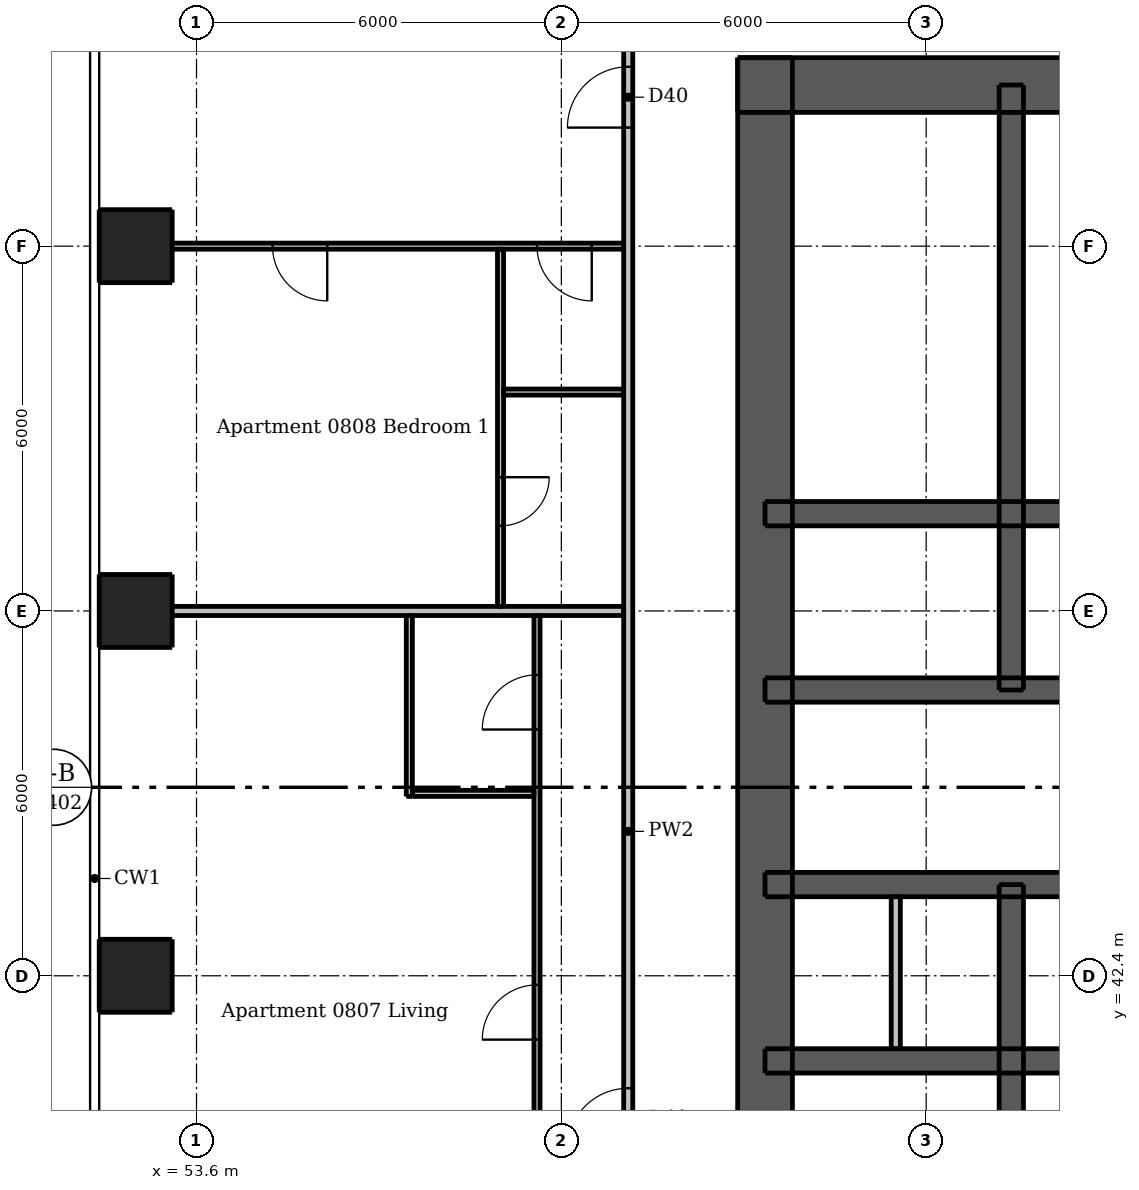
"""IFC4 building model, lengths in metres.
Left out: names, types, materials, properties, quantities, classifications, styles, units other than length and angle.
Written with IfcOpenShell. Run it as: python <this file> out.ifc"""

import sys

from ifc_helpers import new_model, si_unit, direction, frame, frame_2d, origin, origin_2d, place, context, subcontext, project, spatial, rectangle, extrude, element, fill, save


model = new_model("IFC4")
c1 = context("Model", 3, precision=1e-05, world=origin(), true_north=direction((0.0, 1.0)))
c2 = subcontext(c1, "Body", "Model", "MODEL_VIEW")
j1 = project(units=[si_unit("LENGTHUNIT", "METRE"), si_unit("PLANEANGLEUNIT", "RADIAN")], contexts=[c1])
p1 = place(None, origin())
s1 = spatial("IfcSite", under=j1, at=p1, CompositionType="ELEMENT")
p2 = place(p1, origin())
s2 = spatial("IfcBuilding", under=s1, at=p2, CompositionType="ELEMENT")
p3 = place(p2, frame((0.0, 0.0, 33.4)))
s3 = spatial("IfcBuildingStorey", under=s2, at=p3, CompositionType="ELEMENT", Elevation=33.4)
p4 = place(p3, frame((62.5, 57.05, 0.0), z_axis=(0.0, 0.0, 1.0), x_axis=(1.0, 0.0, 0.0)))
e1 = element("IfcWall", 1, at=p4, inside=s3, PredefinedType="SHEAR", context=c2, shape_type="SweptSolid", body=[
    extrude(rectangle(XDim=24.0, YDim=0.9, at=frame_2d((12.0, 0.0))), origin(), (0.0, 0.0, 1.0), 3.05),
])
p5 = place(p4, frame((20.85, 0.0, 0.0)))
e2 = element("IfcOpeningElement", 2, at=p5, cuts=e1, PredefinedType="OPENING", context=c2, shape_type="SweptSolid", body=[
    extrude(rectangle(XDim=1.1, YDim=2.1, at=frame_2d((0.55, 1.05))), frame((0.0, 0.46, 0.0), z_axis=(0.0, -1.0, 0.0), x_axis=(1.0, 0.0, 0.0)), (0.0, 0.0, 1.0), 0.92),
])
p6 = place(p4, frame((2.05, 0.0, 0.0)))
e3 = element("IfcOpeningElement", 3, at=p6, cuts=e1, PredefinedType="OPENING", context=c2, shape_type="SweptSolid", body=[
    extrude(rectangle(XDim=1.1, YDim=2.1, at=frame_2d((0.55, 1.05))), frame((0.0, 0.46, 0.0), z_axis=(0.0, -1.0, 0.0), x_axis=(1.0, 0.0, 0.0)), (0.0, 0.0, 1.0), 0.92),
])
p7 = place(p4, frame((7.9, 0.0, 0.0)))
e4 = element("IfcOpeningElement", 4, at=p7, cuts=e1, PredefinedType="OPENING", context=c2, shape_type="SweptSolid", body=[
    extrude(rectangle(XDim=0.9, YDim=2.1, at=frame_2d((0.45, 1.05))), frame((0.0, 0.46, 0.0), z_axis=(0.0, -1.0, 0.0), x_axis=(1.0, 0.0, 0.0)), (0.0, 0.0, 1.0), 0.92),
])
p8 = place(p4, frame((15.2, 0.0, 0.0)))
e5 = element("IfcOpeningElement", 5, at=p8, cuts=e1, PredefinedType="OPENING", context=c2, shape_type="SweptSolid", body=[
    extrude(rectangle(XDim=0.9, YDim=2.1, at=frame_2d((0.45, 1.05))), frame((0.0, 0.46, 0.0), z_axis=(0.0, -1.0, 0.0), x_axis=(1.0, 0.0, 0.0)), (0.0, 0.0, 1.0), 0.92),
])
p9 = place(p3, frame((62.95, 33.5, 0.0), z_axis=(0.0, 0.0, 1.0), x_axis=(0.0, 1.0, 0.0)))
e6 = element("IfcWall", 6, at=p9, inside=s3, PredefinedType="SHEAR", context=c2, shape_type="SweptSolid", body=[
    extrude(rectangle(XDim=24.0, YDim=0.9, at=frame_2d((12.0, 0.0))), origin(), (0.0, 0.0, 1.0), 3.05),
])
p10 = place(p9, frame((11.2, 0.0, 0.0)))
e7 = element("IfcOpeningElement", 7, at=p10, cuts=e6, PredefinedType="OPENING", context=c2, shape_type="SweptSolid", body=[
    extrude(rectangle(XDim=1.6, YDim=2.1, at=frame_2d((0.8, 1.05))), frame((0.0, 0.46, 0.0), z_axis=(0.0, -1.0, 0.0), x_axis=(1.0, 0.0, 0.0)), (0.0, 0.0, 1.0), 0.92),
])
p11 = place(p3, frame((62.95, 41.0, 0.0), z_axis=(0.0, 0.0, 1.0), x_axis=(1.0, 0.0, 0.0)))
e8 = element("IfcWall", 8, at=p11, inside=s3, PredefinedType="SHEAR", context=c2, shape_type="SweptSolid", body=[
    extrude(rectangle(XDim=23.1, YDim=0.4, at=frame_2d((11.55, 0.0))), origin(), (0.0, 0.0, 1.0), 3.05),
])
p12 = place(p3, frame((62.95, 43.9, 0.0), z_axis=(0.0, 0.0, 1.0), x_axis=(1.0, 0.0, 0.0)))
e9 = element("IfcWall", 9, at=p12, inside=s3, PredefinedType="SHEAR", context=c2, shape_type="SweptSolid", body=[
    extrude(rectangle(XDim=23.1, YDim=0.4, at=frame_2d((11.55, 0.0))), origin(), (0.0, 0.0, 1.0), 3.05),
])
p13 = place(p12, frame((0.85, 0.0, 0.0)))
e10 = element("IfcOpeningElement", 10, at=p13, cuts=e9, PredefinedType="OPENING", context=c2, shape_type="SweptSolid", body=[
    extrude(rectangle(XDim=0.9, YDim=2.1, at=frame_2d((0.45, 1.05))), frame((0.0, 0.21, 0.0), z_axis=(0.0, -1.0, 0.0), x_axis=(1.0, 0.0, 0.0)), (0.0, 0.0, 1.0), 0.42),
])
p14 = place(p12, frame((2.55, 0.0, 0.0)))
e11 = element("IfcOpeningElement", 11, at=p14, cuts=e9, PredefinedType="OPENING", context=c2, shape_type="SweptSolid", body=[
    extrude(rectangle(XDim=0.9, YDim=2.1, at=frame_2d((0.45, 1.05))), frame((0.0, 0.21, 0.0), z_axis=(0.0, -1.0, 0.0), x_axis=(1.0, 0.0, 0.0)), (0.0, 0.0, 1.0), 0.42),
])
p15 = place(p12, frame((20.5, 0.0, 0.0)))
e12 = element("IfcOpeningElement", 12, at=p15, cuts=e9, PredefinedType="OPENING", context=c2, shape_type="SweptSolid", body=[
    extrude(rectangle(XDim=0.9, YDim=2.1, at=frame_2d((0.45, 1.05))), frame((0.0, 0.21, 0.0), z_axis=(0.0, -1.0, 0.0), x_axis=(1.0, 0.0, 0.0)), (0.0, 0.0, 1.0), 0.42),
])
p16 = place(p12, frame((4.75, 0.0, 0.0)))
e13 = element("IfcOpeningElement", 13, at=p16, cuts=e9, PredefinedType="OPENING", context=c2, shape_type="SweptSolid", body=[
    extrude(rectangle(XDim=1.1, YDim=2.1, at=frame_2d((0.55, 1.05))), frame((0.0, 0.21, 0.0), z_axis=(0.0, -1.0, 0.0), x_axis=(1.0, 0.0, 0.0)), (0.0, 0.0, 1.0), 0.42),
])
p17 = place(p12, frame((7.25, 0.0, 0.0)))
e14 = element("IfcOpeningElement", 14, at=p17, cuts=e9, PredefinedType="OPENING", context=c2, shape_type="SweptSolid", body=[
    extrude(rectangle(XDim=1.1, YDim=2.1, at=frame_2d((0.55, 1.05))), frame((0.0, 0.21, 0.0), z_axis=(0.0, -1.0, 0.0), x_axis=(1.0, 0.0, 0.0)), (0.0, 0.0, 1.0), 0.42),
])
p18 = place(p12, frame((9.75, 0.0, 0.0)))
e15 = element("IfcOpeningElement", 15, at=p18, cuts=e9, PredefinedType="OPENING", context=c2, shape_type="SweptSolid", body=[
    extrude(rectangle(XDim=1.1, YDim=2.1, at=frame_2d((0.55, 1.05))), frame((0.0, 0.21, 0.0), z_axis=(0.0, -1.0, 0.0), x_axis=(1.0, 0.0, 0.0)), (0.0, 0.0, 1.0), 0.42),
])
p19 = place(p12, frame((12.25, 0.0, 0.0)))
e16 = element("IfcOpeningElement", 16, at=p19, cuts=e9, PredefinedType="OPENING", context=c2, shape_type="SweptSolid", body=[
    extrude(rectangle(XDim=1.1, YDim=2.1, at=frame_2d((0.55, 1.05))), frame((0.0, 0.21, 0.0), z_axis=(0.0, -1.0, 0.0), x_axis=(1.0, 0.0, 0.0)), (0.0, 0.0, 1.0), 0.42),
])
p20 = place(p12, frame((14.75, 0.0, 0.0)))
e17 = element("IfcOpeningElement", 17, at=p20, cuts=e9, PredefinedType="OPENING", context=c2, shape_type="SweptSolid", body=[
    extrude(rectangle(XDim=1.1, YDim=2.1, at=frame_2d((0.55, 1.05))), frame((0.0, 0.21, 0.0), z_axis=(0.0, -1.0, 0.0), x_axis=(1.0, 0.0, 0.0)), (0.0, 0.0, 1.0), 0.42),
])
p21 = place(p12, frame((17.25, 0.0, 0.0)))
e18 = element("IfcOpeningElement", 18, at=p21, cuts=e9, PredefinedType="OPENING", context=c2, shape_type="SweptSolid", body=[
    extrude(rectangle(XDim=1.1, YDim=2.1, at=frame_2d((0.55, 1.05))), frame((0.0, 0.21, 0.0), z_axis=(0.0, -1.0, 0.0), x_axis=(1.0, 0.0, 0.0)), (0.0, 0.0, 1.0), 0.42),
])
p22 = place(p3, frame((62.95, 47.1, 0.0), z_axis=(0.0, 0.0, 1.0), x_axis=(1.0, 0.0, 0.0)))
e19 = element("IfcWall", 19, at=p22, inside=s3, PredefinedType="SHEAR", context=c2, shape_type="SweptSolid", body=[
    extrude(rectangle(XDim=23.1, YDim=0.4, at=frame_2d((11.55, 0.0))), origin(), (0.0, 0.0, 1.0), 3.05),
])
p23 = place(p22, frame((1.7, 0.0, 0.0)))
e20 = element("IfcOpeningElement", 20, at=p23, cuts=e19, PredefinedType="OPENING", context=c2, shape_type="SweptSolid", body=[
    extrude(rectangle(XDim=0.9, YDim=2.1, at=frame_2d((0.45, 1.05))), frame((0.0, 0.21, 0.0), z_axis=(0.0, -1.0, 0.0), x_axis=(1.0, 0.0, 0.0)), (0.0, 0.0, 1.0), 0.42),
])
p24 = place(p22, frame((20.5, 0.0, 0.0)))
e21 = element("IfcOpeningElement", 21, at=p24, cuts=e19, PredefinedType="OPENING", context=c2, shape_type="SweptSolid", body=[
    extrude(rectangle(XDim=0.9, YDim=2.1, at=frame_2d((0.45, 1.05))), frame((0.0, 0.21, 0.0), z_axis=(0.0, -1.0, 0.0), x_axis=(1.0, 0.0, 0.0)), (0.0, 0.0, 1.0), 0.42),
])
p25 = place(p3, frame((62.95, 50.0, 0.0), z_axis=(0.0, 0.0, 1.0), x_axis=(1.0, 0.0, 0.0)))
e22 = element("IfcWall", 22, at=p25, inside=s3, PredefinedType="SHEAR", context=c2, shape_type="SweptSolid", body=[
    extrude(rectangle(XDim=23.1, YDim=0.4, at=frame_2d((11.55, 0.0))), origin(), (0.0, 0.0, 1.0), 3.05),
])
p26 = place(p3, frame((67.0, 33.95, 0.0), z_axis=(0.0, 0.0, 1.0), x_axis=(0.0, 1.0, 0.0)))
e23 = element("IfcWall", 23, at=p26, inside=s3, PredefinedType="SHEAR", context=c2, shape_type="SweptSolid", body=[
    extrude(rectangle(XDim=9.95, YDim=0.4, at=frame_2d((4.975, 0.0))), origin(), (0.0, 0.0, 1.0), 3.05),
])
p27 = place(p26, frame((0.65, 0.0, 0.0)))
e24 = element("IfcOpeningElement", 24, at=p27, cuts=e23, PredefinedType="OPENING", context=c2, shape_type="SweptSolid", body=[
    extrude(rectangle(XDim=1.1, YDim=2.1, at=frame_2d((0.55, 1.05))), frame((0.0, 0.21, 0.0), z_axis=(0.0, -1.0, 0.0), x_axis=(1.0, 0.0, 0.0)), (0.0, 0.0, 1.0), 0.42),
])
p28 = place(p3, frame((67.0, 47.1, 0.0), z_axis=(0.0, 0.0, 1.0), x_axis=(0.0, 1.0, 0.0)))
e25 = element("IfcWall", 25, at=p28, inside=s3, PredefinedType="SHEAR", context=c2, shape_type="SweptSolid", body=[
    extrude(rectangle(XDim=9.95, YDim=0.4, at=frame_2d((4.975, 0.0))), origin(), (0.0, 0.0, 1.0), 3.05),
])
for number, where, z_axis, x_axis in (
    (26, (52.6, 42.4, 0.0), (0.0, 0.0, 1.0), (1.0, 0.0, 0.0)),
    (27, (52.6, 48.4, 0.0), (0.0, 0.0, 1.0), (1.0, 0.0, 0.0)),
    (28, (52.6, 54.4, 0.0), (0.0, 0.0, 1.0), (1.0, 0.0, 0.0)),
):
    element("IfcColumn", number, at=place(p3, frame(where, z_axis=z_axis, x_axis=x_axis)), inside=s3, PredefinedType="COLUMN", context=c2, shape_type="SweptSolid", body=[
        extrude(rectangle(XDim=1.2, YDim=1.2, at=origin_2d()), origin(), (0.0, 0.0, 1.0), 3.05),
    ])
p29 = place(p3, frame((65.1, 41.2, 0.0), z_axis=(0.0, 0.0, 1.0), x_axis=(0.0, 1.0, 0.0)))
e29 = element("IfcWall", 29, at=p29, inside=s3, PredefinedType="PLUMBINGWALL", context=c2, shape_type="SweptSolid", body=[
    extrude(rectangle(XDim=2.5, YDim=0.15, at=frame_2d((1.25, 0.0))), origin(), (0.0, 0.0, 1.0), 3.05),
])
p30 = place(p3, frame((57.1, 45.35, 0.0), z_axis=(0.0, 0.0, 1.0), x_axis=(0.0, 1.0, 0.0)))
e30 = element("IfcWall", 30, at=p30, inside=s3, PredefinedType="PARTITIONING", context=c2, shape_type="SweptSolid", body=[
    extrude(rectangle(XDim=2.975, YDim=0.1, at=frame_2d((1.487, 0.0))), origin(), (0.0, 0.0, 1.0), 3.05),
])
p31 = place(p3, frame((58.6, 54.35, 0.0), z_axis=(0.0, 0.0, 1.0), x_axis=(0.0, -1.0, 0.0)))
e31 = element("IfcWall", 31, at=p31, inside=s3, PredefinedType="PARTITIONING", context=c2, shape_type="SweptSolid", body=[
    extrude(rectangle(XDim=5.875, YDim=0.1, at=frame_2d((2.938, 0.0))), origin(), (0.0, 0.0, 1.0), 3.05),
])
p32 = place(p31, frame((3.75, 0.0, 0.0)))
e32 = element("IfcOpeningElement", 32, at=p32, cuts=e31, PredefinedType="OPENING", context=c2, shape_type="SweptSolid", body=[
    extrude(rectangle(XDim=0.8, YDim=2.1, at=frame_2d((0.4, 1.05))), frame((0.0, 0.06, 0.0), z_axis=(0.0, -1.0, 0.0), x_axis=(1.0, 0.0, 0.0)), (0.0, 0.0, 1.0), 0.12),
])
p33 = place(p3, frame((59.2, 31.65, 0.0), z_axis=(0.0, 0.0, 1.0), x_axis=(0.0, 1.0, 0.0)))
e33 = element("IfcWall", 33, at=p33, inside=s3, PredefinedType="PARTITIONING", context=c2, shape_type="SweptSolid", body=[
    extrude(rectangle(XDim=16.675, YDim=0.1, at=frame_2d((8.337, 0.0))), origin(), (0.0, 0.0, 1.0), 3.05),
])
p34 = place(p33, frame((9.7, 0.0, 0.0)))
e34 = element("IfcOpeningElement", 34, at=p34, cuts=e33, PredefinedType="OPENING", context=c2, shape_type="SweptSolid", body=[
    extrude(rectangle(XDim=0.9, YDim=2.1, at=frame_2d((0.45, 1.05))), frame((0.0, 0.06, 0.0), z_axis=(0.0, -1.0, 0.0), x_axis=(1.0, 0.0, 0.0)), (0.0, 0.0, 1.0), 0.12),
])
p35 = place(p33, frame((14.8, 0.0, 0.0)))
e35 = element("IfcOpeningElement", 35, at=p35, cuts=e33, PredefinedType="OPENING", context=c2, shape_type="SweptSolid", body=[
    extrude(rectangle(XDim=0.9, YDim=2.1, at=frame_2d((0.45, 1.05))), frame((0.0, 0.06, 0.0), z_axis=(0.0, -1.0, 0.0), x_axis=(1.0, 0.0, 0.0)), (0.0, 0.0, 1.0), 0.12),
])
p36 = place(p33, frame((5.25, 0.0, 0.0)))
e36 = element("IfcOpeningElement", 36, at=p36, cuts=e33, PredefinedType="OPENING", context=c2, shape_type="SweptSolid", body=[
    extrude(rectangle(XDim=0.8, YDim=2.1, at=frame_2d((0.4, 1.05))), frame((0.0, 0.06, 0.0), z_axis=(0.0, -1.0, 0.0), x_axis=(1.0, 0.0, 0.0)), (0.0, 0.0, 1.0), 0.12),
])
p37 = place(p33, frame((0.75, 0.0, 0.0)))
e37 = element("IfcOpeningElement", 37, at=p37, cuts=e33, PredefinedType="OPENING", context=c2, shape_type="SweptSolid", body=[
    extrude(rectangle(XDim=0.9, YDim=2.1, at=frame_2d((0.45, 1.05))), frame((0.0, 0.06, 0.0), z_axis=(0.0, -1.0, 0.0), x_axis=(1.0, 0.0, 0.0)), (0.0, 0.0, 1.0), 0.12),
])
p38 = place(p33, frame((3.15, 0.0, 0.0)))
e38 = element("IfcOpeningElement", 38, at=p38, cuts=e33, PredefinedType="OPENING", context=c2, shape_type="SweptSolid", body=[
    extrude(rectangle(XDim=0.8, YDim=2.1, at=frame_2d((0.4, 1.05))), frame((0.0, 0.06, 0.0), z_axis=(0.0, -1.0, 0.0), x_axis=(1.0, 0.0, 0.0)), (0.0, 0.0, 1.0), 0.12),
])
p39 = place(p3, frame((60.625, 54.4, 0.0), z_axis=(0.0, 0.0, 1.0), x_axis=(-1.0, 0.0, 0.0)))
e39 = element("IfcWall", 39, at=p39, inside=s3, PredefinedType="PARTITIONING", context=c2, shape_type="SweptSolid", body=[
    extrude(rectangle(XDim=8.625, YDim=0.1, at=frame_2d((4.312, 0.0))), origin(), (0.0, 0.0, 1.0), 2.516),
])
p40 = place(p39, frame((0.525, 0.0, 0.0)))
e40 = element("IfcOpeningElement", 40, at=p40, cuts=e39, PredefinedType="OPENING", context=c2, shape_type="SweptSolid", body=[
    extrude(rectangle(XDim=0.9, YDim=2.1, at=frame_2d((0.45, 1.05))), frame((0.0, 0.06, 0.0), z_axis=(0.0, -1.0, 0.0), x_axis=(1.0, 0.0, 0.0)), (0.0, 0.0, 1.0), 0.12),
])
p41 = place(p39, frame((4.875, 0.0, 0.0)))
e41 = element("IfcOpeningElement", 41, at=p41, cuts=e39, PredefinedType="OPENING", context=c2, shape_type="SweptSolid", body=[
    extrude(rectangle(XDim=0.9, YDim=2.1, at=frame_2d((0.45, 1.05))), frame((0.0, 0.06, 0.0), z_axis=(0.0, -1.0, 0.0), x_axis=(1.0, 0.0, 0.0)), (0.0, 0.0, 1.0), 0.12),
])
p42 = place(p3, frame((58.65, 52.0, 0.0), z_axis=(0.0, 0.0, 1.0), x_axis=(1.0, 0.0, 0.0)))
e42 = element("IfcWall", 42, at=p42, inside=s3, PredefinedType="PARTITIONING", context=c2, shape_type="SweptSolid", body=[
    extrude(rectangle(XDim=1.975, YDim=0.1, at=frame_2d((0.988, 0.0))), origin(), (0.0, 0.0, 1.0), 3.05),
])
p43 = place(p3, frame((57.15, 45.4, 0.0), z_axis=(0.0, 0.0, 1.0), x_axis=(1.0, 0.0, 0.0)))
e43 = element("IfcWall", 43, at=p43, inside=s3, PredefinedType="PARTITIONING", context=c2, shape_type="SweptSolid", body=[
    extrude(rectangle(XDim=2.0, YDim=0.1, at=frame_2d((1.0, 0.0))), origin(), (0.0, 0.0, 1.0), 3.05),
])
p44 = place(p3, frame((60.7, 30.325, 0.0), z_axis=(0.0, 0.0, 1.0), x_axis=(0.0, 1.0, 0.0)))
e44 = element("IfcWall", 44, at=p44, inside=s3, PredefinedType="PARTITIONING", context=c2, shape_type="SweptSolid", body=[
    extrude(rectangle(XDim=28.9, YDim=0.15, at=frame_2d((14.45, 0.0))), origin(), (0.0, 0.0, 1.0), 3.05),
])
p45 = place(p44, frame((9.225, 0.0, 0.0)))
e45 = element("IfcOpeningElement", 45, at=p45, cuts=e44, PredefinedType="OPENING", context=c2, shape_type="SweptSolid", body=[
    extrude(rectangle(XDim=1.0, YDim=2.1, at=frame_2d((0.5, 1.05))), frame((0.0, 0.085, 0.0), z_axis=(0.0, -1.0, 0.0), x_axis=(1.0, 0.0, 0.0)), (0.0, 0.0, 1.0), 0.17),
])
p46 = place(p44, frame((26.025, 0.0, 0.0)))
e46 = element("IfcOpeningElement", 46, at=p46, cuts=e44, PredefinedType="OPENING", context=c2, shape_type="SweptSolid", body=[
    extrude(rectangle(XDim=1.0, YDim=2.1, at=frame_2d((0.5, 1.05))), frame((0.0, 0.085, 0.0), z_axis=(0.0, -1.0, 0.0), x_axis=(1.0, 0.0, 0.0)), (0.0, 0.0, 1.0), 0.17),
])
p47 = place(p3, frame((52.0, 48.4, 0.0), z_axis=(0.0, 0.0, 1.0), x_axis=(1.0, 0.0, 0.0)))
e47 = element("IfcWall", 47, at=p47, inside=s3, PredefinedType="PARTITIONING", context=c2, shape_type="SweptSolid", body=[
    extrude(rectangle(XDim=8.625, YDim=0.15, at=frame_2d((4.312, 0.0))), origin(), (0.0, 0.0, 1.0), 2.516),
])
p48 = place(p6, origin())
e48 = element("IfcDoor", 48, at=p48, inside=s3, OperationType="SINGLE_SWING_LEFT", PredefinedType="DOOR", context=c2, shape_type="SweptSolid", body=[
    extrude(rectangle(XDim=1.1, YDim=2.1, at=frame_2d((0.55, 1.05))), frame((0.0, -0.388, 0.0), z_axis=(0.0, -1.0, 0.0), x_axis=(1.0, 0.0, 0.0)), (0.0, 0.0, 1.0), 0.05),
])
fill(e3, e48)
p49 = place(p10, origin())
e49 = element("IfcDoor", 49, at=p49, inside=s3, OperationType="DOUBLE_DOOR_SINGLE_SWING", PredefinedType="DOOR", context=c2, shape_type="SweptSolid", body=[
    extrude(rectangle(XDim=1.6, YDim=2.1, at=frame_2d((0.8, 1.05))), frame((0.0, -0.388, 0.0), z_axis=(0.0, -1.0, 0.0), x_axis=(1.0, 0.0, 0.0)), (0.0, 0.0, 1.0), 0.05),
])
fill(e7, e49)
p50 = place(p13, origin())
e50 = element("IfcDoor", 50, at=p50, inside=s3, OperationType="SINGLE_SWING_LEFT", PredefinedType="DOOR", context=c2, shape_type="SweptSolid", body=[
    extrude(rectangle(XDim=0.9, YDim=2.1, at=frame_2d((0.45, 1.05))), frame((0.0, -0.138, 0.0), z_axis=(0.0, -1.0, 0.0), x_axis=(1.0, 0.0, 0.0)), (0.0, 0.0, 1.0), 0.05),
])
fill(e10, e50)
p51 = place(p14, origin())
e51 = element("IfcDoor", 51, at=p51, inside=s3, OperationType="SINGLE_SWING_RIGHT", PredefinedType="DOOR", context=c2, shape_type="SweptSolid", body=[
    extrude(rectangle(XDim=0.9, YDim=2.1, at=frame_2d((0.45, 1.05))), frame((0.0, -0.138, 0.0), z_axis=(0.0, -1.0, 0.0), x_axis=(1.0, 0.0, 0.0)), (0.0, 0.0, 1.0), 0.05),
])
fill(e11, e51)
p52 = place(p23, origin())
e52 = element("IfcDoor", 52, at=p52, inside=s3, OperationType="SINGLE_SWING_LEFT", PredefinedType="DOOR", context=c2, shape_type="SweptSolid", body=[
    extrude(rectangle(XDim=0.9, YDim=2.1, at=frame_2d((0.45, 1.05))), frame((0.0, 0.188, 0.0), z_axis=(0.0, -1.0, 0.0), x_axis=(1.0, 0.0, 0.0)), (0.0, 0.0, 1.0), 0.05),
])
fill(e20, e52)
p53 = place(p16, origin())
e53 = element("IfcDoor", 53, at=p53, inside=s3, OperationType="DOUBLE_DOOR_SLIDING", PredefinedType="DOOR", context=c2, shape_type="SweptSolid", body=[
    extrude(rectangle(XDim=1.1, YDim=2.1, at=frame_2d((0.55, 1.05))), frame((0.0, 0.025, 0.0), z_axis=(0.0, -1.0, 0.0), x_axis=(1.0, 0.0, 0.0)), (0.0, 0.0, 1.0), 0.05),
])
fill(e13, e53)
p54 = place(p45, origin())
e54 = element("IfcDoor", 54, at=p54, inside=s3, OperationType="SINGLE_SWING_LEFT", PredefinedType="DOOR", context=c2, shape_type="SweptSolid", body=[
    extrude(rectangle(XDim=1.0, YDim=2.1, at=frame_2d((0.5, 1.05))), frame((0.0, 0.025, 0.0), z_axis=(0.0, -1.0, 0.0), x_axis=(1.0, 0.0, 0.0)), (0.0, 0.0, 1.0), 0.05),
])
fill(e45, e54)
p55 = place(p34, origin())
e55 = element("IfcDoor", 55, at=p55, inside=s3, OperationType="SINGLE_SWING_LEFT", PredefinedType="DOOR", context=c2, shape_type="SweptSolid", body=[
    extrude(rectangle(XDim=0.9, YDim=2.1, at=frame_2d((0.45, 1.05))), frame((0.0, 0.025, 0.0), z_axis=(0.0, -1.0, 0.0), x_axis=(1.0, 0.0, 0.0)), (0.0, 0.0, 1.0), 0.05),
])
fill(e34, e55)
p56 = place(p35, origin())
e56 = element("IfcDoor", 56, at=p56, inside=s3, OperationType="SINGLE_SWING_LEFT", PredefinedType="DOOR", context=c2, shape_type="SweptSolid", body=[
    extrude(rectangle(XDim=0.9, YDim=2.1, at=frame_2d((0.45, 1.05))), frame((0.0, 0.025, 0.0), z_axis=(0.0, -1.0, 0.0), x_axis=(1.0, 0.0, 0.0)), (0.0, 0.0, 1.0), 0.05),
])
fill(e35, e56)
p57 = place(p46, origin())
e57 = element("IfcDoor", 57, at=p57, inside=s3, OperationType="SINGLE_SWING_LEFT", PredefinedType="DOOR", context=c2, shape_type="SweptSolid", body=[
    extrude(rectangle(XDim=1.0, YDim=2.1, at=frame_2d((0.5, 1.05))), frame((0.0, 0.025, 0.0), z_axis=(0.0, -1.0, 0.0), x_axis=(1.0, 0.0, 0.0)), (0.0, 0.0, 1.0), 0.05),
])
fill(e46, e57)
p58 = place(p40, origin())
e58 = element("IfcDoor", 58, at=p58, inside=s3, OperationType="SINGLE_SWING_LEFT", PredefinedType="DOOR", context=c2, shape_type="SweptSolid", body=[
    extrude(rectangle(XDim=0.9, YDim=2.1, at=frame_2d((0.45, 1.05))), frame((0.0, 0.025, 0.0), z_axis=(0.0, -1.0, 0.0), x_axis=(1.0, 0.0, 0.0)), (0.0, 0.0, 1.0), 0.05),
])
fill(e40, e58)
p59 = place(p41, origin())
e59 = element("IfcDoor", 59, at=p59, inside=s3, OperationType="SINGLE_SWING_LEFT", PredefinedType="DOOR", context=c2, shape_type="SweptSolid", body=[
    extrude(rectangle(XDim=0.9, YDim=2.1, at=frame_2d((0.45, 1.05))), frame((0.0, 0.025, 0.0), z_axis=(0.0, -1.0, 0.0), x_axis=(1.0, 0.0, 0.0)), (0.0, 0.0, 1.0), 0.05),
])
fill(e41, e59)
p60 = place(p32, origin())
e60 = element("IfcDoor", 60, at=p60, inside=s3, OperationType="SINGLE_SWING_LEFT", PredefinedType="DOOR", context=c2, shape_type="SweptSolid", body=[
    extrude(rectangle(XDim=0.8, YDim=2.1, at=frame_2d((0.4, 1.05))), frame((0.0, 0.025, 0.0), z_axis=(0.0, -1.0, 0.0), x_axis=(1.0, 0.0, 0.0)), (0.0, 0.0, 1.0), 0.05),
])
fill(e32, e60)
save(model, sys.argv[1])
